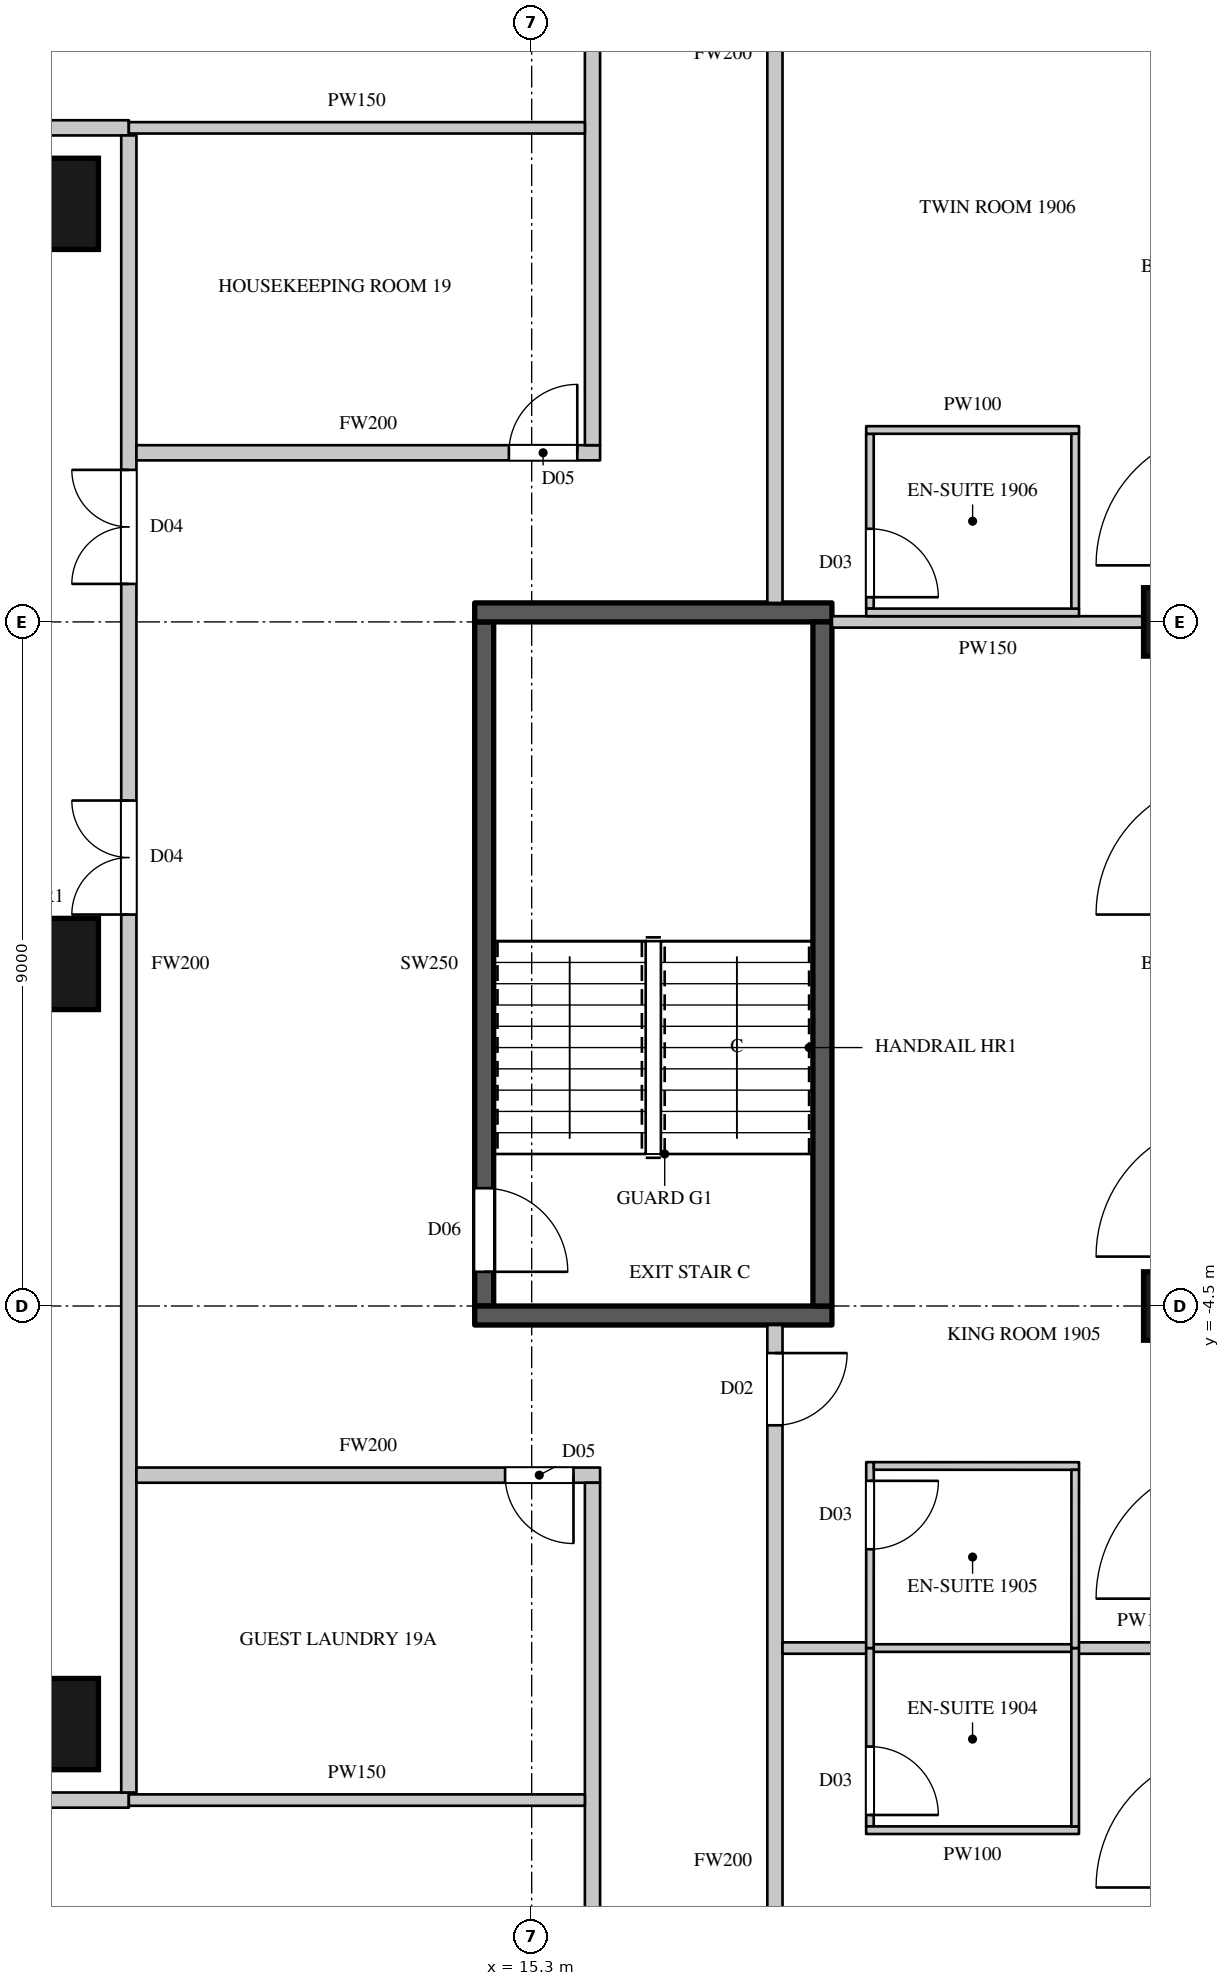
"""IFC4 building model, lengths in metres.
Left out: names, types, materials, properties, quantities, classifications, styles, units other than length and angle.
Written with IfcOpenShell. Run it as: python <this file> out.ifc"""

import sys

from ifc_helpers import new_model, si_unit, direction, frame, frame_2d, origin, origin_2d, place, context, subcontext, project, spatial, rectangle, circle, extrude, element, fill, save


model = new_model("IFC4")
c1 = context("Model", 3, precision=1e-05, world=origin(), true_north=direction((0.0, 1.0)))
c2 = subcontext(c1, "Body", "Model", "MODEL_VIEW")
j1 = project(units=[si_unit("LENGTHUNIT", "METRE"), si_unit("PLANEANGLEUNIT", "RADIAN")], contexts=[c1])
p1 = place(None, origin())
s1 = spatial("IfcSite", under=j1, at=p1, CompositionType="ELEMENT")
p2 = place(p1, origin())
s2 = spatial("IfcBuilding", under=s1, at=p2, CompositionType="ELEMENT")
p3 = place(p2, frame((0.0, 0.0, 98.7)))
s3 = spatial("IfcBuildingStorey", under=s2, at=p3, CompositionType="ELEMENT", Elevation=98.7)
for number, where, z_axis, x_axis in (
    (1, (24.05, -4.5, 0.0), (0.0, 0.0, 1.0), (0.0, 1.0, 0.0)),
    (2, (24.05, 4.5, 0.0), (0.0, 0.0, 1.0), (0.0, 1.0, 0.0)),
):
    element("IfcColumn", number, at=place(p3, frame(where, z_axis=z_axis, x_axis=x_axis)), inside=s3, PredefinedType="COLUMN", context=c2, shape_type="SweptSolid", body=[
        extrude(rectangle(XDim=0.9, YDim=1.4, at=origin_2d()), origin(), (0.0, 0.0, 1.0), 3.6),
    ])
for number, where, z_axis, x_axis in (
    (3, (9.0, -10.0, 0.0), (0.0, 0.0, 1.0), (1.0, 0.0, 0.0)),
    (4, (9.0, 0.0, 0.0), (0.0, 0.0, 1.0), (1.0, 0.0, 0.0)),
    (5, (9.0, 10.0, 0.0), (0.0, 0.0, 1.0), (1.0, 0.0, 0.0)),
):
    element("IfcColumn", number, at=place(p3, frame(where, z_axis=z_axis, x_axis=x_axis)), inside=s3, PredefinedType="COLUMN", context=c2, shape_type="SweptSolid", body=[
        extrude(circle(Radius=0.6, at=origin_2d()), origin(), (0.0, 0.0, 1.0), 3.6),
    ])
p4 = place(p3, frame((-8.1, -11.0, 0.0), z_axis=(0.0, 0.0, 1.0), x_axis=(1.0, 0.0, 0.0)))
e6 = element("IfcWall", 6, at=p4, inside=s3, PredefinedType="PARTITIONING", context=c2, shape_type="SweptSolid", body=[
    extrude(rectangle(XDim=18.1, YDim=0.2, at=frame_2d((9.05, 0.0))), origin(), (0.0, 0.0, 1.0), 3.3),
])
p5 = place(p4, frame((1.7, 0.0, 0.0)))
e7 = element("IfcOpeningElement", 7, at=p5, cuts=e6, PredefinedType="OPENING", context=c2, shape_type="SweptSolid", body=[
    extrude(rectangle(XDim=1.5, YDim=2.2, at=frame_2d((0.75, 1.1))), frame((0.0, 0.11, 0.0), z_axis=(0.0, -1.0, 0.0), x_axis=(1.0, 0.0, 0.0)), (0.0, 0.0, 1.0), 0.22),
])
p6 = place(p3, frame((-7.9, 11.0, 0.0), z_axis=(0.0, 0.0, 1.0), x_axis=(1.0, 0.0, 0.0)))
e8 = element("IfcWall", 8, at=p6, inside=s3, PredefinedType="PARTITIONING", context=c2, shape_type="SweptSolid", body=[
    extrude(rectangle(XDim=17.9, YDim=0.2, at=frame_2d((8.95, 0.0))), origin(), (0.0, 0.0, 1.0), 3.3),
])
p7 = place(p6, frame((6.5, 0.0, 0.0)))
e9 = element("IfcOpeningElement", 9, at=p7, cuts=e8, PredefinedType="OPENING", context=c2, shape_type="SweptSolid", body=[
    extrude(rectangle(XDim=1.5, YDim=2.2, at=frame_2d((0.75, 1.1))), frame((0.0, 0.11, 0.0), z_axis=(0.0, -1.0, 0.0), x_axis=(1.0, 0.0, 0.0)), (0.0, 0.0, 1.0), 0.22),
])
p8 = place(p3, frame((10.0, -10.9, 0.0), z_axis=(0.0, 0.0, 1.0), x_axis=(0.0, 1.0, 0.0)))
e10 = element("IfcWall", 10, at=p8, inside=s3, PredefinedType="PARTITIONING", context=c2, shape_type="SweptSolid", body=[
    extrude(rectangle(XDim=21.8, YDim=0.2, at=frame_2d((10.9, 0.0))), origin(), (0.0, 0.0, 1.0), 3.3),
])
p9 = place(p8, frame((15.9, 0.0, 0.0)))
e11 = element("IfcOpeningElement", 11, at=p9, cuts=e10, PredefinedType="OPENING", context=c2, shape_type="SweptSolid", body=[
    extrude(rectangle(XDim=1.5, YDim=2.2, at=frame_2d((0.75, 1.1))), frame((0.0, 0.11, 0.0), z_axis=(0.0, -1.0, 0.0), x_axis=(1.0, 0.0, 0.0)), (0.0, 0.0, 1.0), 0.22),
])
p10 = place(p8, frame((11.55, 0.0, 0.0)))
e12 = element("IfcOpeningElement", 12, at=p10, cuts=e10, PredefinedType="OPENING", context=c2, shape_type="SweptSolid", body=[
    extrude(rectangle(XDim=1.5, YDim=2.2, at=frame_2d((0.75, 1.1))), frame((0.0, 0.11, 0.0), z_axis=(0.0, -1.0, 0.0), x_axis=(1.0, 0.0, 0.0)), (0.0, 0.0, 1.0), 0.22),
])
p11 = place(p3, frame((10.1, -6.725, 0.0), z_axis=(0.0, 0.0, 1.0), x_axis=(1.0, 0.0, 0.0)))
e13 = element("IfcWall", 13, at=p11, inside=s3, PredefinedType="PARTITIONING", context=c2, shape_type="SweptSolid", body=[
    extrude(rectangle(XDim=6.1, YDim=0.2, at=frame_2d((3.05, 0.0))), origin(), (0.0, 0.0, 1.0), 3.3),
])
p12 = place(p11, frame((4.85, 0.0, 0.0)))
e14 = element("IfcOpeningElement", 14, at=p12, cuts=e13, PredefinedType="OPENING", context=c2, shape_type="SweptSolid", body=[
    extrude(rectangle(XDim=0.9, YDim=2.2, at=frame_2d((0.45, 1.1))), frame((0.0, 0.11, 0.0), z_axis=(0.0, -1.0, 0.0), x_axis=(1.0, 0.0, 0.0)), (0.0, 0.0, 1.0), 0.22),
])
p13 = place(p3, frame((10.1, 6.725, 0.0), z_axis=(0.0, 0.0, 1.0), x_axis=(1.0, 0.0, 0.0)))
e15 = element("IfcWall", 15, at=p13, inside=s3, PredefinedType="PARTITIONING", context=c2, shape_type="SweptSolid", body=[
    extrude(rectangle(XDim=6.1, YDim=0.2, at=frame_2d((3.05, 0.0))), origin(), (0.0, 0.0, 1.0), 3.3),
])
p14 = place(p13, frame((4.9, 0.0, 0.0)))
e16 = element("IfcOpeningElement", 16, at=p14, cuts=e15, PredefinedType="OPENING", context=c2, shape_type="SweptSolid", body=[
    extrude(rectangle(XDim=0.9, YDim=2.2, at=frame_2d((0.45, 1.1))), frame((0.0, 0.11, 0.0), z_axis=(0.0, -1.0, 0.0), x_axis=(1.0, 0.0, 0.0)), (0.0, 0.0, 1.0), 0.22),
])
for number, where, z_axis, x_axis in (
    (17, (16.1, -17.4, 0.0), (0.0, 0.0, 1.0), (0.0, 1.0, 0.0)),
    (18, (16.1, 6.825, 0.0), (0.0, 0.0, 1.0), (0.0, 1.0, 0.0)),
):
    element("IfcWall", number, at=place(p3, frame(where, z_axis=z_axis, x_axis=x_axis)), inside=s3, PredefinedType="PARTITIONING", context=c2, shape_type="SweptSolid", body=[
        extrude(rectangle(XDim=10.575, YDim=0.2, at=frame_2d((5.288, 0.0))), origin(), (0.0, 0.0, 1.0), 3.3),
    ])
p15 = place(p3, frame((18.5, -18.869, 0.0), z_axis=(0.0, 0.0, 1.0), x_axis=(0.0, 1.0, 0.0)))
e19 = element("IfcWall", 19, at=p15, inside=s3, PredefinedType="PARTITIONING", context=c2, shape_type="SweptSolid", body=[
    extrude(rectangle(XDim=14.119, YDim=0.2, at=frame_2d((7.06, 0.0))), origin(), (0.0, 0.0, 1.0), 3.3),
])
p16 = place(p15, frame((3.4, 0.0, 0.0)))
e20 = element("IfcOpeningElement", 20, at=p16, cuts=e19, PredefinedType="OPENING", context=c2, shape_type="SweptSolid", body=[
    extrude(rectangle(XDim=0.95, YDim=2.2, at=frame_2d((0.475, 1.1))), frame((0.0, 0.11, 0.0), z_axis=(0.0, -1.0, 0.0), x_axis=(1.0, 0.0, 0.0)), (0.0, 0.0, 1.0), 0.22),
])
p17 = place(p15, frame((12.8, 0.0, 0.0)))
e21 = element("IfcOpeningElement", 21, at=p17, cuts=e19, PredefinedType="OPENING", context=c2, shape_type="SweptSolid", body=[
    extrude(rectangle(XDim=0.95, YDim=2.2, at=frame_2d((0.475, 1.1))), frame((0.0, 0.11, 0.0), z_axis=(0.0, -1.0, 0.0), x_axis=(1.0, 0.0, 0.0)), (0.0, 0.0, 1.0), 0.22),
])
p18 = place(p3, frame((18.5, 4.75, 0.0), z_axis=(0.0, 0.0, 1.0), x_axis=(0.0, 1.0, 0.0)))
e22 = element("IfcWall", 22, at=p18, inside=s3, PredefinedType="PARTITIONING", context=c2, shape_type="SweptSolid", body=[
    extrude(rectangle(XDim=14.434, YDim=0.2, at=frame_2d((7.217, 0.0))), origin(), (0.0, 0.0, 1.0), 3.3),
])
p19 = place(p18, frame((7.65, 0.0, 0.0)))
e23 = element("IfcOpeningElement", 23, at=p19, cuts=e22, PredefinedType="OPENING", context=c2, shape_type="SweptSolid", body=[
    extrude(rectangle(XDim=0.95, YDim=2.2, at=frame_2d((0.475, 1.1))), frame((0.0, 0.11, 0.0), z_axis=(0.0, -1.0, 0.0), x_axis=(1.0, 0.0, 0.0)), (0.0, 0.0, 1.0), 0.22),
])
for number, where, z_axis, x_axis in (
    (24, (10.0, -11.0, 0.0), (0.0, 0.0, 1.0), (1.0, 0.0, 0.0)),
    (25, (10.0, 11.0, 0.0), (0.0, 0.0, 1.0), (1.0, 0.0, 0.0)),
):
    element("IfcWall", number, at=place(p3, frame(where, z_axis=z_axis, x_axis=x_axis)), inside=s3, PredefinedType="PARTITIONING", context=c2, shape_type="SweptSolid", body=[
        extrude(rectangle(XDim=6.0, YDim=0.15, at=frame_2d((3.0, 0.0))), origin(), (0.0, 0.0, 1.0), 3.3),
    ])
p20 = place(p3, frame((18.6, -9.0, 0.0), z_axis=(0.0, 0.0, 1.0), x_axis=(1.0, 0.0, 0.0)))
e26 = element("IfcWall", 26, at=p20, inside=s3, PredefinedType="PARTITIONING", context=c2, shape_type="SweptSolid", body=[
    extrude(rectangle(XDim=1.13, YDim=0.15, at=frame_2d((0.565, 0.0))), origin(), (0.0, 0.0, 1.0), 2.65),
])
p21 = place(p3, frame((19.25, 4.5, 0.0), z_axis=(0.0, 0.0, 1.0), x_axis=(1.0, 0.0, 0.0)))
e27 = element("IfcWall", 27, at=p21, inside=s3, PredefinedType="PARTITIONING", context=c2, shape_type="SweptSolid", body=[
    extrude(rectangle(XDim=4.1, YDim=0.15, at=frame_2d((2.05, 0.0))), origin(), (0.0, 0.0, 1.0), 3.3),
])
p22 = place(p3, frame((22.47, -9.0, 0.0), z_axis=(0.0, 0.0, 1.0), x_axis=(1.0, 0.0, 0.0)))
e28 = element("IfcWall", 28, at=p22, inside=s3, PredefinedType="PARTITIONING", context=c2, shape_type="SweptSolid", body=[
    extrude(rectangle(XDim=1.83, YDim=0.15, at=frame_2d((0.915, 0.0))), origin(), (0.0, 0.0, 1.0), 2.65),
])
p23 = place(p3, frame((14.675, -4.5, 0.0), z_axis=(0.0, 0.0, 1.0), x_axis=(0.0, 1.0, 0.0)))
e29 = element("IfcWall", 29, at=p23, inside=s3, PredefinedType="SHEAR", context=c2, shape_type="SweptSolid", body=[
    extrude(rectangle(XDim=9.0, YDim=0.25, at=frame_2d((4.5, 0.0))), origin(), (0.0, 0.0, 1.0), 3.3),
])
p24 = place(p23, frame((0.45, 0.0, 0.0)))
e30 = element("IfcOpeningElement", 30, at=p24, cuts=e29, PredefinedType="OPENING", context=c2, shape_type="SweptSolid", body=[
    extrude(rectangle(XDim=1.1, YDim=2.2, at=frame_2d((0.55, 1.1))), frame((0.0, 0.135, 0.0), z_axis=(0.0, -1.0, 0.0), x_axis=(1.0, 0.0, 0.0)), (0.0, 0.0, 1.0), 0.27),
])
for number, where, z_axis, x_axis in (
    (31, (14.55, -4.625, 0.0), (0.0, 0.0, 1.0), (1.0, 0.0, 0.0)),
    (32, (14.55, 4.625, 0.0), (0.0, 0.0, 1.0), (1.0, 0.0, 0.0)),
):
    element("IfcWall", number, at=place(p3, frame(where, z_axis=z_axis, x_axis=x_axis)), inside=s3, PredefinedType="SHEAR", context=c2, shape_type="SweptSolid", body=[
        extrude(rectangle(XDim=4.7, YDim=0.25, at=frame_2d((2.35, 0.0))), origin(), (0.0, 0.0, 1.0), 3.3),
    ])
p25 = place(p3, frame((19.125, -4.5, 0.0), z_axis=(0.0, 0.0, 1.0), x_axis=(0.0, 1.0, 0.0)))
e33 = element("IfcWall", 33, at=p25, inside=s3, PredefinedType="SHEAR", context=c2, shape_type="SweptSolid", body=[
    extrude(rectangle(XDim=9.0, YDim=0.25, at=frame_2d((4.5, 0.0))), origin(), (0.0, 0.0, 1.0), 3.3),
])
p26 = place(p3, frame((19.73, -9.0, 0.0), z_axis=(0.0, 0.0, 1.0), x_axis=(1.0, 0.0, 0.0)))
e34 = element("IfcWall", 34, at=p26, inside=s3, PredefinedType="PARTITIONING", context=c2, shape_type="SweptSolid", body=[
    extrude(rectangle(XDim=2.74, YDim=0.1, at=frame_2d((1.37, 0.0))), origin(), (0.0, 0.0, 1.0), 2.65),
])
p27 = place(p3, frame((19.75, -11.346, 0.0), z_axis=(0.0, 0.0, 1.0), x_axis=(0.0, 1.0, 0.0)))
e35 = element("IfcWall", 35, at=p27, inside=s3, PredefinedType="PARTITIONING", context=c2, shape_type="SweptSolid", body=[
    extrude(rectangle(XDim=2.346, YDim=0.1, at=frame_2d((1.173, 0.0))), origin(), (0.0, 0.0, 1.0), 3.3),
])
p28 = place(p27, frame((0.15, 0.0, 0.0)))
e36 = element("IfcOpeningElement", 36, at=p28, cuts=e35, PredefinedType="OPENING", context=c2, shape_type="SweptSolid", body=[
    extrude(rectangle(XDim=0.9, YDim=2.2, at=frame_2d((0.45, 1.1))), frame((0.0, 0.06, 0.0), z_axis=(0.0, -1.0, 0.0), x_axis=(1.0, 0.0, 0.0)), (0.0, 0.0, 1.0), 0.12),
])
p29 = place(p3, frame((19.7, -11.396, 0.0), z_axis=(0.0, 0.0, 1.0), x_axis=(1.0, 0.0, 0.0)))
e37 = element("IfcWall", 37, at=p29, inside=s3, PredefinedType="PARTITIONING", context=c2, shape_type="SweptSolid", body=[
    extrude(rectangle(XDim=2.8, YDim=0.1, at=frame_2d((1.4, 0.0))), origin(), (0.0, 0.0, 1.0), 3.3),
])
p30 = place(p3, frame((19.75, -9.0, 0.0), z_axis=(0.0, 0.0, 1.0), x_axis=(0.000399241409, 0.999999920303, 0.0)))
e38 = element("IfcWall", 38, at=p30, inside=s3, PredefinedType="PARTITIONING", context=c2, shape_type="SweptSolid", body=[
    extrude(rectangle(XDim=2.446, YDim=0.1, at=frame_2d((1.223, 0.0))), origin(), (0.0, 0.0, 1.0), 3.3),
])
p31 = place(p30, frame((1.3, 0.0, 0.0)))
e39 = element("IfcOpeningElement", 39, at=p31, cuts=e38, PredefinedType="OPENING", context=c2, shape_type="SweptSolid", body=[
    extrude(rectangle(XDim=0.9, YDim=2.2, at=frame_2d((0.45, 1.1))), frame((0.0, 0.06, 0.0), z_axis=(0.0, -1.0, 0.0), x_axis=(1.0, 0.0, 0.0)), (0.0, 0.0, 1.0), 0.12),
])
p32 = place(p3, frame((19.75, 4.675, 0.0), z_axis=(0.0, 0.0, 1.0), x_axis=(0.0, 1.0, 0.0)))
e40 = element("IfcWall", 40, at=p32, inside=s3, PredefinedType="PARTITIONING", context=c2, shape_type="SweptSolid", body=[
    extrude(rectangle(XDim=2.3, YDim=0.1, at=frame_2d((1.15, 0.0))), origin(), (0.0, 0.0, 1.0), 3.3),
])
p33 = place(p32, frame((0.15, 0.0, 0.0)))
e41 = element("IfcOpeningElement", 41, at=p33, cuts=e40, PredefinedType="OPENING", context=c2, shape_type="SweptSolid", body=[
    extrude(rectangle(XDim=0.9, YDim=2.2, at=frame_2d((0.45, 1.1))), frame((0.0, 0.06, 0.0), z_axis=(0.0, -1.0, 0.0), x_axis=(1.0, 0.0, 0.0)), (0.0, 0.0, 1.0), 0.12),
])
p34 = place(p3, frame((19.801, -6.604, 0.0), z_axis=(0.0, 0.0, 1.0), x_axis=(0.999999934588, -0.000361696332, 0.0)))
e42 = element("IfcWall", 42, at=p34, inside=s3, PredefinedType="PARTITIONING", context=c2, shape_type="SweptSolid", body=[
    extrude(rectangle(XDim=2.7, YDim=0.1, at=frame_2d((1.35, 0.0))), origin(), (0.0, 0.0, 1.0), 3.3),
])
for number, where, z_axis, x_axis in (
    (43, (19.701, 4.625, 0.0), (0.0, 0.0, 1.0), (1.0, 0.0, 0.0)),
    (44, (19.701, 7.025, 0.0), (0.0, 0.0, 1.0), (1.0, 0.0, 0.0)),
):
    element("IfcWall", number, at=place(p3, frame(where, z_axis=z_axis, x_axis=x_axis)), inside=s3, PredefinedType="PARTITIONING", context=c2, shape_type="SweptSolid", body=[
        extrude(rectangle(XDim=2.8, YDim=0.1, at=frame_2d((1.4, 0.0))), origin(), (0.0, 0.0, 1.0), 3.3),
    ])
p35 = place(p3, frame((22.45, -11.346, 0.0), z_axis=(0.0, 0.0, 1.0), x_axis=(0.0, 1.0, 0.0)))
e45 = element("IfcWall", 45, at=p35, inside=s3, PredefinedType="PARTITIONING", context=c2, shape_type="SweptSolid", body=[
    extrude(rectangle(XDim=2.346, YDim=0.1, at=frame_2d((1.173, 0.0))), origin(), (0.0, 0.0, 1.0), 3.3),
])
p36 = place(p3, frame((22.45, -9.0, 0.0), z_axis=(0.0, 0.0, 1.0), x_axis=(0.00041644973, 0.999999913285, 0.0)))
e46 = element("IfcWall", 46, at=p36, inside=s3, PredefinedType="PARTITIONING", context=c2, shape_type="SweptSolid", body=[
    extrude(rectangle(XDim=2.345, YDim=0.1, at=frame_2d((1.172, 0.0))), origin(), (0.0, 0.0, 1.0), 3.3),
])
p37 = place(p3, frame((22.45, 4.675, 0.0), z_axis=(0.0, 0.0, 1.0), x_axis=(0.0, 1.0, 0.0)))
e47 = element("IfcWall", 47, at=p37, inside=s3, PredefinedType="PARTITIONING", context=c2, shape_type="SweptSolid", body=[
    extrude(rectangle(XDim=2.3, YDim=0.1, at=frame_2d((1.15, 0.0))), origin(), (0.0, 0.0, 1.0), 3.3),
])
p38 = place(p9, origin())
e48 = element("IfcDoor", 48, at=p38, inside=s3, OperationType="DOUBLE_DOOR_SINGLE_SWING", PredefinedType="DOOR", context=c2, shape_type="SweptSolid", body=[
    extrude(rectangle(XDim=1.5, YDim=2.2, at=frame_2d((0.75, 1.1))), frame((0.0, 0.025, 0.0), z_axis=(0.0, -1.0, 0.0), x_axis=(1.0, 0.0, 0.0)), (0.0, 0.0, 1.0), 0.05),
])
fill(e11, e48)
p39 = place(p10, origin())
e49 = element("IfcDoor", 49, at=p39, inside=s3, OperationType="DOUBLE_DOOR_SINGLE_SWING", PredefinedType="DOOR", context=c2, shape_type="SweptSolid", body=[
    extrude(rectangle(XDim=1.5, YDim=2.2, at=frame_2d((0.75, 1.1))), frame((0.0, 0.025, 0.0), z_axis=(0.0, -1.0, 0.0), x_axis=(1.0, 0.0, 0.0)), (0.0, 0.0, 1.0), 0.05),
])
fill(e12, e49)
p40 = place(p12, origin())
e50 = element("IfcDoor", 50, at=p40, inside=s3, OperationType="SINGLE_SWING_LEFT", PredefinedType="DOOR", context=c2, shape_type="SweptSolid", body=[
    extrude(rectangle(XDim=0.9, YDim=2.2, at=frame_2d((0.45, 1.1))), frame((0.0, 0.025, 0.0), z_axis=(0.0, -1.0, 0.0), x_axis=(1.0, 0.0, 0.0)), (0.0, 0.0, 1.0), 0.05),
])
fill(e14, e50)
p41 = place(p14, origin())
e51 = element("IfcDoor", 51, at=p41, inside=s3, OperationType="SINGLE_SWING_RIGHT", PredefinedType="DOOR", context=c2, shape_type="SweptSolid", body=[
    extrude(rectangle(XDim=0.9, YDim=2.2, at=frame_2d((0.45, 1.1))), frame((0.0, 0.025, 0.0), z_axis=(0.0, -1.0, 0.0), x_axis=(1.0, 0.0, 0.0)), (0.0, 0.0, 1.0), 0.05),
])
fill(e16, e51)
p42 = place(p28, origin())
e52 = element("IfcDoor", 52, at=p42, inside=s3, OperationType="SINGLE_SWING_RIGHT", PredefinedType="DOOR", context=c2, shape_type="SweptSolid", body=[
    extrude(rectangle(XDim=0.9, YDim=2.2, at=frame_2d((0.45, 1.1))), frame((0.0, 0.025, 0.0), z_axis=(0.0, -1.0, 0.0), x_axis=(1.0, 0.0, 0.0)), (0.0, 0.0, 1.0), 0.05),
])
fill(e36, e52)
p43 = place(p17, origin())
e53 = element("IfcDoor", 53, at=p43, inside=s3, OperationType="SINGLE_SWING_LEFT", PredefinedType="DOOR", context=c2, shape_type="SweptSolid", body=[
    extrude(rectangle(XDim=0.95, YDim=2.2, at=frame_2d((0.475, 1.1))), frame((0.0, 0.025, 0.0), z_axis=(0.0, -1.0, 0.0), x_axis=(1.0, 0.0, 0.0)), (0.0, 0.0, 1.0), 0.05),
])
fill(e21, e53)
p44 = place(p31, origin())
e54 = element("IfcDoor", 54, at=p44, inside=s3, OperationType="SINGLE_SWING_LEFT", PredefinedType="DOOR", context=c2, shape_type="SweptSolid", body=[
    extrude(rectangle(XDim=0.9, YDim=2.2, at=frame_2d((0.45, 1.1))), frame((0.0, 0.025, 0.0), z_axis=(0.0, -1.0, 0.0), x_axis=(1.0, 0.0, 0.0)), (0.0, 0.0, 1.0), 0.05),
])
fill(e39, e54)
p45 = place(p33, origin())
e55 = element("IfcDoor", 55, at=p45, inside=s3, OperationType="SINGLE_SWING_RIGHT", PredefinedType="DOOR", context=c2, shape_type="SweptSolid", body=[
    extrude(rectangle(XDim=0.9, YDim=2.2, at=frame_2d((0.45, 1.1))), frame((0.0, 0.025, 0.0), z_axis=(0.0, -1.0, 0.0), x_axis=(1.0, 0.0, 0.0)), (0.0, 0.0, 1.0), 0.05),
])
fill(e41, e55)
p46 = place(p24, origin())
e56 = element("IfcDoor", 56, at=p46, inside=s3, OperationType="SINGLE_SWING_RIGHT", PredefinedType="DOOR", context=c2, shape_type="SweptSolid", body=[
    extrude(rectangle(XDim=1.1, YDim=2.2, at=frame_2d((0.55, 1.1))), frame((0.0, 0.025, 0.0), z_axis=(0.0, -1.0, 0.0), x_axis=(1.0, 0.0, 0.0)), (0.0, 0.0, 1.0), 0.05),
])
fill(e30, e56)
save(model, sys.argv[1])
